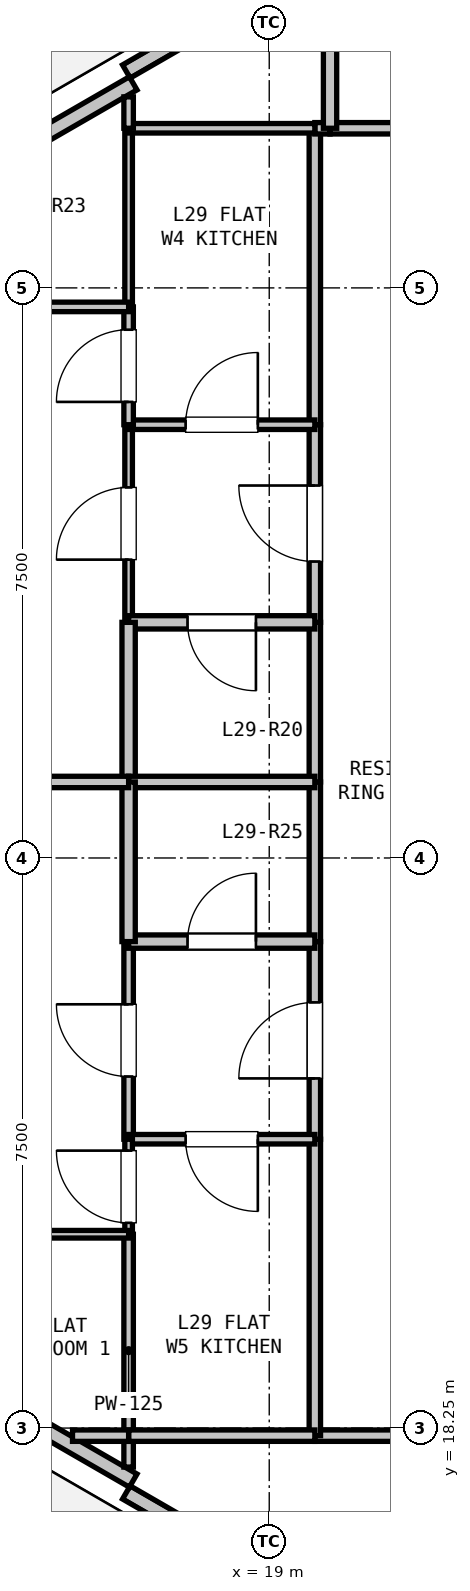
"""IFC4 building model, lengths in metres.
Left out: names, types, materials, properties, quantities, classifications, styles, units other than length and angle.
Written with IfcOpenShell. Run it as: python <this file> out.ifc"""

import sys

from ifc_helpers import new_model, si_unit, direction, frame, frame_2d, origin, place, context, subcontext, project, spatial, rectangle, extrude, element, fill, save


model = new_model("IFC4")
c1 = context("Model", 3, precision=1e-05, world=origin(), true_north=direction((0.0, 1.0)))
c2 = subcontext(c1, "Body", "Model", "MODEL_VIEW")
j1 = project(units=[si_unit("LENGTHUNIT", "METRE"), si_unit("PLANEANGLEUNIT", "RADIAN")], contexts=[c1])
p1 = place(None, origin())
s1 = spatial("IfcSite", under=j1, at=p1, CompositionType="ELEMENT")
p2 = place(p1, origin())
s2 = spatial("IfcBuilding", under=s1, at=p2, CompositionType="ELEMENT")
p3 = place(p2, frame((0.0, 0.0, 106.5)))
s3 = spatial("IfcBuildingStorey", under=s2, at=p3, CompositionType="ELEMENT", Elevation=106.5)
p4 = place(p3, frame((17.12, 36.097, 0.0), z_axis=(0.0, 0.0, 1.0), x_axis=(0.866027010039, 0.499997217876, 0.0)))
e1 = element("IfcWall", 1, at=p4, inside=s3, PredefinedType="PARAPET", context=c2, shape_type="SweptSolid", body=[
    extrude(rectangle(XDim=11.229, YDim=0.2, at=frame_2d((5.615, 0.0))), origin(), (0.0, 0.0, 1.0), 0.2),
])
p5 = place(p3, frame((15.738, 35.091, 0.0), z_axis=(0.0, 0.0, 1.0), x_axis=(0.866025371046, 0.500000056704, 0.0)))
e2 = element("IfcWall", 2, at=p5, inside=s3, PredefinedType="PARAPET", context=c2, shape_type="SweptSolid", body=[
    extrude(rectangle(XDim=1.7, YDim=0.2, at=frame_2d((0.85, 0.0))), origin(), (0.0, 0.0, 1.0), 2.67),
])
p6 = place(p3, frame((26.845, 11.788, 0.0), z_axis=(0.0, 0.0, 1.0), x_axis=(-0.866027010039, 0.499997217876, 0.0)))
e3 = element("IfcWall", 3, at=p6, inside=s3, PredefinedType="PARAPET", context=c2, shape_type="SweptSolid", body=[
    extrude(rectangle(XDim=11.229, YDim=0.2, at=frame_2d((5.615, 0.0))), origin(), (0.0, 0.0, 1.0), 0.2),
])
p7 = place(p3, frame((17.21, 17.559, 0.0), z_axis=(0.0, 0.0, 1.0), x_axis=(-0.866025371046, 0.500000056704, 0.0)))
e4 = element("IfcWall", 4, at=p7, inside=s3, PredefinedType="PARAPET", context=c2, shape_type="SweptSolid", body=[
    extrude(rectangle(XDim=1.7, YDim=0.2, at=frame_2d((0.85, 0.0))), origin(), (0.0, 0.0, 1.0), 2.67),
])
p8 = place(p3, frame((26.2, 18.15, 0.0), z_axis=(0.0, 0.0, 1.0), x_axis=(-1.0, 0.0, 0.0)))
e5 = element("IfcWall", 5, at=p8, inside=s3, PredefinedType="PARTITIONING", context=c2, shape_type="SweptSolid", body=[
    extrude(rectangle(XDim=6.6, YDim=0.15, at=frame_2d((3.3, 0.0))), origin(), (0.0, 0.0, 1.0), 2.423),
])
p9 = place(p8, frame((2.4, 0.0, 0.0)))
e6 = element("IfcOpeningElement", 6, at=p9, cuts=e5, PredefinedType="OPENING", context=c2, shape_type="SweptSolid", body=[
    extrude(rectangle(XDim=1.8, YDim=2.2, at=frame_2d((0.9, 1.1))), frame((0.0, 0.085, 0.0), z_axis=(0.0, -1.0, 0.0), x_axis=(1.0, 0.0, 0.0)), (0.0, 0.0, 1.0), 0.17),
])
p10 = place(p3, frame((19.6, 18.15, 0.0), z_axis=(0.0, 0.0, 1.0), x_axis=(0.0, 1.0, 0.0)))
e7 = element("IfcWall", 7, at=p10, inside=s3, PredefinedType="PARTITIONING", context=c2, shape_type="SweptSolid", body=[
    extrude(rectangle(XDim=3.9, YDim=0.15, at=frame_2d((1.95, 0.0))), origin(), (0.0, 0.0, 1.0), 2.423),
])
p11 = place(p3, frame((19.6, 22.05, 0.0), z_axis=(0.0, 0.0, 1.0), x_axis=(0.0, 1.0, 0.0)))
e8 = element("IfcWall", 8, at=p11, inside=s3, PredefinedType="PARTITIONING", context=c2, shape_type="SweptSolid", body=[
    extrude(rectangle(XDim=2.6, YDim=0.15, at=frame_2d((1.3, 0.0))), origin(), (0.0, 0.0, 1.0), 3.05),
])
p12 = place(p11, frame((0.8, 0.0, 0.0)))
e9 = element("IfcOpeningElement", 9, at=p12, cuts=e8, PredefinedType="OPENING", context=c2, shape_type="SweptSolid", body=[
    extrude(rectangle(XDim=1.0, YDim=2.15, at=frame_2d((0.5, 1.075))), frame((0.0, 0.085, 0.0), z_axis=(0.0, -1.0, 0.0), x_axis=(1.0, 0.0, 0.0)), (0.0, 0.0, 1.0), 0.17),
])
for number, where, z_axis, x_axis in (
    (10, (19.6, 24.65, 0.0), (0.0, 0.0, 1.0), (0.0, 1.0, 0.0)),
    (11, (19.6, 26.75, 0.0), (0.0, 0.0, 1.0), (0.0, 1.0, 0.0)),
):
    element("IfcWall", number, at=place(p3, frame(where, z_axis=z_axis, x_axis=x_axis)), inside=s3, PredefinedType="PARTITIONING", context=c2, shape_type="SweptSolid", body=[
        extrude(rectangle(XDim=2.1, YDim=0.15, at=frame_2d((1.05, 0.0))), origin(), (0.0, 0.0, 1.0), 3.05),
    ])
p13 = place(p3, frame((19.6, 28.85, 0.0), z_axis=(0.0, 0.0, 1.0), x_axis=(0.0, 1.0, 0.0)))
e12 = element("IfcWall", 12, at=p13, inside=s3, PredefinedType="PARTITIONING", context=c2, shape_type="SweptSolid", body=[
    extrude(rectangle(XDim=2.6, YDim=0.15, at=frame_2d((1.3, 0.0))), origin(), (0.0, 0.0, 1.0), 3.05),
])
p14 = place(p13, frame((0.8, 0.0, 0.0)))
e13 = element("IfcOpeningElement", 13, at=p14, cuts=e12, PredefinedType="OPENING", context=c2, shape_type="SweptSolid", body=[
    extrude(rectangle(XDim=1.0, YDim=2.15, at=frame_2d((0.5, 1.075))), frame((0.0, 0.085, 0.0), z_axis=(0.0, -1.0, 0.0), x_axis=(1.0, 0.0, 0.0)), (0.0, 0.0, 1.0), 0.17),
])
p15 = place(p3, frame((19.6, 31.45, 0.0), z_axis=(0.0, 0.0, 1.0), x_axis=(0.0, 1.0, 0.0)))
e14 = element("IfcWall", 14, at=p15, inside=s3, PredefinedType="PARTITIONING", context=c2, shape_type="SweptSolid", body=[
    extrude(rectangle(XDim=3.9, YDim=0.15, at=frame_2d((1.95, 0.0))), origin(), (0.0, 0.0, 1.0), 2.423),
])
p16 = place(p3, frame((19.6, 35.35, 0.0), z_axis=(0.0, 0.0, 1.0), x_axis=(1.0, 0.0, 0.0)))
e15 = element("IfcWall", 15, at=p16, inside=s3, PredefinedType="PARTITIONING", context=c2, shape_type="SweptSolid", body=[
    extrude(rectangle(XDim=0.2, YDim=0.15, at=frame_2d((0.1, 0.0))), origin(), (0.0, 0.0, 1.0), 3.05),
])
p17 = place(p3, frame((19.8, 35.35, 0.0), z_axis=(0.0, 0.0, 1.0), x_axis=(1.0, 0.0, 0.0)))
e16 = element("IfcWall", 16, at=p17, inside=s3, PredefinedType="PARTITIONING", context=c2, shape_type="SweptSolid", body=[
    extrude(rectangle(XDim=2.0, YDim=0.15, at=frame_2d((1.0, 0.0))), origin(), (0.0, 0.0, 1.0), 3.05),
])
p18 = place(p3, frame((17.15, 28.85, 0.0), z_axis=(0.0, 0.0, 1.0), x_axis=(0.0, 1.0, 0.0)))
e17 = element("IfcWall", 17, at=p18, inside=s3, PredefinedType="PARTITIONING", context=c2, shape_type="SweptSolid", body=[
    extrude(rectangle(XDim=2.6, YDim=0.1, at=frame_2d((1.3, 0.0))), origin(), (0.0, 0.0, 1.0), 3.05),
])
p19 = place(p18, frame((0.825, 0.0, 0.0)))
e18 = element("IfcOpeningElement", 18, at=p19, cuts=e17, PredefinedType="OPENING", context=c2, shape_type="SweptSolid", body=[
    extrude(rectangle(XDim=0.95, YDim=2.1, at=frame_2d((0.475, 1.05))), frame((0.0, 0.06, 0.0), z_axis=(0.0, -1.0, 0.0), x_axis=(1.0, 0.0, 0.0)), (0.0, 0.0, 1.0), 0.12),
])
p20 = place(p3, frame((17.15, 31.45, 0.0), z_axis=(0.0, 0.0, 1.0), x_axis=(1.0, 0.0, 0.0)))
e19 = element("IfcWall", 19, at=p20, inside=s3, PredefinedType="PARTITIONING", context=c2, shape_type="SweptSolid", body=[
    extrude(rectangle(XDim=2.45, YDim=0.125, at=frame_2d((1.225, 0.0))), origin(), (0.0, 0.0, 1.0), 3.05),
])
p21 = place(p20, frame((0.75, 0.0, 0.0)))
e20 = element("IfcOpeningElement", 20, at=p21, cuts=e19, PredefinedType="OPENING", context=c2, shape_type="SweptSolid", body=[
    extrude(rectangle(XDim=0.95, YDim=2.1, at=frame_2d((0.475, 1.05))), frame((0.0, 0.073, 0.0), z_axis=(0.0, -1.0, 0.0), x_axis=(1.0, 0.0, 0.0)), (0.0, 0.0, 1.0), 0.145),
])
p22 = place(p3, frame((19.6, 28.85, 0.0), z_axis=(0.0, 0.0, 1.0), x_axis=(-1.0, 0.0, 0.0)))
e21 = element("IfcWall", 21, at=p22, inside=s3, PredefinedType="PLUMBINGWALL", context=c2, shape_type="SweptSolid", body=[
    extrude(rectangle(XDim=2.45, YDim=0.175, at=frame_2d((1.225, 0.0))), origin(), (0.0, 0.0, 1.0), 3.05),
])
p23 = place(p22, frame((0.775, 0.0, 0.0)))
e22 = element("IfcOpeningElement", 22, at=p23, cuts=e21, PredefinedType="OPENING", context=c2, shape_type="SweptSolid", body=[
    extrude(rectangle(XDim=0.9, YDim=2.1, at=frame_2d((0.45, 1.05))), frame((0.0, 0.097, 0.0), z_axis=(0.0, -1.0, 0.0), x_axis=(1.0, 0.0, 0.0)), (0.0, 0.0, 1.0), 0.195),
])
p24 = place(p3, frame((17.15, 22.05, 0.0), z_axis=(0.0, 0.0, 1.0), x_axis=(0.0, 1.0, 0.0)))
e23 = element("IfcWall", 23, at=p24, inside=s3, PredefinedType="PARTITIONING", context=c2, shape_type="SweptSolid", body=[
    extrude(rectangle(XDim=2.6, YDim=0.125, at=frame_2d((1.3, 0.0))), origin(), (0.0, 0.0, 1.0), 3.05),
])
p25 = place(p24, frame((0.825, 0.0, 0.0)))
e24 = element("IfcOpeningElement", 24, at=p25, cuts=e23, PredefinedType="OPENING", context=c2, shape_type="SweptSolid", body=[
    extrude(rectangle(XDim=0.95, YDim=2.1, at=frame_2d((0.475, 1.05))), frame((0.0, 0.073, 0.0), z_axis=(0.0, -1.0, 0.0), x_axis=(1.0, 0.0, 0.0)), (0.0, 0.0, 1.0), 0.145),
])
p26 = place(p3, frame((17.15, 24.65, 0.0), z_axis=(0.0, 0.0, 1.0), x_axis=(1.0, 0.0, 0.0)))
e25 = element("IfcWall", 25, at=p26, inside=s3, PredefinedType="PLUMBINGWALL", context=c2, shape_type="SweptSolid", body=[
    extrude(rectangle(XDim=2.45, YDim=0.175, at=frame_2d((1.225, 0.0))), origin(), (0.0, 0.0, 1.0), 3.05),
])
p27 = place(p26, frame((0.775, 0.0, 0.0)))
e26 = element("IfcOpeningElement", 26, at=p27, cuts=e25, PredefinedType="OPENING", context=c2, shape_type="SweptSolid", body=[
    extrude(rectangle(XDim=0.9, YDim=2.1, at=frame_2d((0.45, 1.05))), frame((0.0, 0.097, 0.0), z_axis=(0.0, -1.0, 0.0), x_axis=(1.0, 0.0, 0.0)), (0.0, 0.0, 1.0), 0.195),
])
p28 = place(p3, frame((19.6, 22.05, 0.0), z_axis=(0.0, 0.0, 1.0), x_axis=(-1.0, 0.0, 0.0)))
e27 = element("IfcWall", 27, at=p28, inside=s3, PredefinedType="PARTITIONING", context=c2, shape_type="SweptSolid", body=[
    extrude(rectangle(XDim=2.45, YDim=0.125, at=frame_2d((1.225, 0.0))), origin(), (0.0, 0.0, 1.0), 3.05),
])
p29 = place(p28, frame((0.75, 0.0, 0.0)))
e28 = element("IfcOpeningElement", 28, at=p29, cuts=e27, PredefinedType="OPENING", context=c2, shape_type="SweptSolid", body=[
    extrude(rectangle(XDim=0.95, YDim=2.1, at=frame_2d((0.475, 1.05))), frame((0.0, 0.073, 0.0), z_axis=(0.0, -1.0, 0.0), x_axis=(1.0, 0.0, 0.0)), (0.0, 0.0, 1.0), 0.145),
])
p30 = place(p3, frame((19.8, 35.35, 0.0), z_axis=(0.0, 0.0, 1.0), x_axis=(0.0, 1.0, 0.0)))
e29 = element("IfcWall", 29, at=p30, inside=s3, PredefinedType="PLUMBINGWALL", context=c2, shape_type="SweptSolid", body=[
    extrude(rectangle(XDim=2.252, YDim=0.175, at=frame_2d((1.126, 0.0))), origin(), (0.0, 0.0, 1.0), 2.365),
])
p31 = place(p3, frame((17.15, 26.75, 0.0), z_axis=(0.0, 0.0, 1.0), x_axis=(0.0, 1.0, 0.0)))
e30 = element("IfcWall", 30, at=p31, inside=s3, PredefinedType="PLUMBINGWALL", context=c2, shape_type="SweptSolid", body=[
    extrude(rectangle(XDim=2.1, YDim=0.175, at=frame_2d((1.05, 0.0))), origin(), (0.0, 0.0, 1.0), 3.05),
])
p32 = place(p3, frame((19.6, 26.75, 0.0), z_axis=(0.0, 0.0, 1.0), x_axis=(-1.0, 0.0, 0.0)))
e31 = element("IfcWall", 31, at=p32, inside=s3, PredefinedType="PARTITIONING", context=c2, shape_type="SweptSolid", body=[
    extrude(rectangle(XDim=2.45, YDim=0.15, at=frame_2d((1.225, 0.0))), origin(), (0.0, 0.0, 1.0), 3.05),
])
p33 = place(p3, frame((17.15, 31.45, 0.0), z_axis=(0.0, 0.0, 1.0), x_axis=(0.0, 1.0, 0.0)))
e32 = element("IfcWall", 32, at=p33, inside=s3, PredefinedType="PARTITIONING", context=c2, shape_type="SweptSolid", body=[
    extrude(rectangle(XDim=1.55, YDim=0.125, at=frame_2d((0.775, 0.0))), origin(), (0.0, 0.0, 1.0), 2.423),
])
p34 = place(p33, frame((0.3, 0.0, 0.0)))
e33 = element("IfcOpeningElement", 33, at=p34, cuts=e32, PredefinedType="OPENING", context=c2, shape_type="SweptSolid", body=[
    extrude(rectangle(XDim=0.95, YDim=2.1, at=frame_2d((0.475, 1.05))), frame((0.0, 0.073, 0.0), z_axis=(0.0, -1.0, 0.0), x_axis=(1.0, 0.0, 0.0)), (0.0, 0.0, 1.0), 0.145),
])
p35 = place(p3, frame((17.15, 33.0, 0.0), z_axis=(0.0, 0.0, 1.0), x_axis=(0.0, 1.0, 0.0)))
e34 = element("IfcWall", 34, at=p35, inside=s3, PredefinedType="PARTITIONING", context=c2, shape_type="SweptSolid", body=[
    extrude(rectangle(XDim=2.35, YDim=0.1, at=frame_2d((1.175, 0.0))), origin(), (0.0, 0.0, 1.0), 2.365),
])
p36 = place(p3, frame((17.15, 35.35, 0.0), z_axis=(0.0, 0.0, 1.0), x_axis=(1.0, 0.0, 0.0)))
e35 = element("IfcWall", 35, at=p36, inside=s3, PredefinedType="PARTITIONING", context=c2, shape_type="SweptSolid", body=[
    extrude(rectangle(XDim=2.45, YDim=0.125, at=frame_2d((1.225, 0.0))), origin(), (0.0, 0.0, 1.0), 2.365),
])
p37 = place(p3, frame((17.15, 24.65, 0.0), z_axis=(0.0, 0.0, 1.0), x_axis=(0.0, 1.0, 0.0)))
e36 = element("IfcWall", 36, at=p37, inside=s3, PredefinedType="PLUMBINGWALL", context=c2, shape_type="SweptSolid", body=[
    extrude(rectangle(XDim=2.1, YDim=0.175, at=frame_2d((1.05, 0.0))), origin(), (0.0, 0.0, 1.0), 3.05),
])
p38 = place(p3, frame((17.15, 17.737, 0.0), z_axis=(0.0, 0.0, 1.0), x_axis=(0.0, 1.0, 0.0)))
e37 = element("IfcWall", 37, at=p38, inside=s3, PredefinedType="PARTITIONING", context=c2, shape_type="SweptSolid", body=[
    extrude(rectangle(XDim=3.063, YDim=0.125, at=frame_2d((1.532, 0.0))), origin(), (0.0, 0.0, 1.0), 2.365),
])
p39 = place(p3, frame((17.15, 20.8, 0.0), z_axis=(0.0, 0.0, 1.0), x_axis=(0.0, 1.0, 0.0)))
e38 = element("IfcWall", 38, at=p39, inside=s3, PredefinedType="PARTITIONING", context=c2, shape_type="SweptSolid", body=[
    extrude(rectangle(XDim=1.25, YDim=0.1, at=frame_2d((0.625, 0.0))), origin(), (0.0, 0.0, 1.0), 2.423),
])
p40 = place(p39, frame((0.15, 0.0, 0.0)))
e39 = element("IfcOpeningElement", 39, at=p40, cuts=e38, PredefinedType="OPENING", context=c2, shape_type="SweptSolid", body=[
    extrude(rectangle(XDim=0.95, YDim=2.1, at=frame_2d((0.475, 1.05))), frame((0.0, 0.06, 0.0), z_axis=(0.0, -1.0, 0.0), x_axis=(1.0, 0.0, 0.0)), (0.0, 0.0, 1.0), 0.12),
])
p41 = place(p3, frame((19.6, 18.15, 0.0), z_axis=(0.0, 0.0, 1.0), x_axis=(-1.0, 0.0, 0.0)))
e40 = element("IfcWall", 40, at=p41, inside=s3, PredefinedType="PARTITIONING", context=c2, shape_type="SweptSolid", body=[
    extrude(rectangle(XDim=2.45, YDim=0.15, at=frame_2d((1.225, 0.0))), origin(), (0.0, 0.0, 1.0), 2.365),
])
p42 = place(p3, frame((16.412, 18.15, 0.0), z_axis=(0.0, 0.0, 1.0), x_axis=(1.0, 0.0, 0.0)))
e41 = element("IfcWall", 41, at=p42, inside=s3, PredefinedType="PARTITIONING", context=c2, shape_type="SweptSolid", body=[
    extrude(rectangle(XDim=0.738, YDim=0.15, at=frame_2d((0.369, 0.0))), origin(), (0.0, 0.0, 1.0), 2.365),
])
p43 = place(p3, frame((12.027, 33.0, 0.0), z_axis=(0.0, 0.0, 1.0), x_axis=(1.0, 0.0, 0.0)))
e42 = element("IfcWall", 42, at=p43, inside=s3, PredefinedType="PARTITIONING", context=c2, shape_type="SweptSolid", body=[
    extrude(rectangle(XDim=5.123, YDim=0.125, at=frame_2d((2.562, 0.0))), origin(), (0.0, 0.0, 1.0), 2.365),
])
p44 = place(p43, frame((2.086, 0.0, 0.0)))
e43 = element("IfcOpeningElement", 43, at=p44, cuts=e42, PredefinedType="OPENING", context=c2, shape_type="SweptSolid", body=[
    extrude(rectangle(XDim=0.95, YDim=2.1, at=frame_2d((0.475, 1.05))), frame((0.0, 0.073, 0.0), z_axis=(0.0, -1.0, 0.0), x_axis=(1.0, 0.0, 0.0)), (0.0, 0.0, 1.0), 0.145),
])
p45 = place(p3, frame((17.15, 26.75, 0.0), z_axis=(0.0, 0.0, 1.0), x_axis=(-1.0, 0.0, 0.0)))
e44 = element("IfcWall", 44, at=p45, inside=s3, PredefinedType="PARTITIONING", context=c2, shape_type="SweptSolid", body=[
    extrude(rectangle(XDim=11.814, YDim=0.15, at=frame_2d((5.907, 0.0))), origin(), (0.0, 0.0, 1.0), 2.715),
])
p46 = place(p3, frame((17.15, 35.763, 0.0), z_axis=(0.0, 0.0, 1.0), x_axis=(0.0, -1.0, 0.0)))
e45 = element("IfcWall", 45, at=p46, inside=s3, PredefinedType="PARTITIONING", context=c2, shape_type="SweptSolid", body=[
    extrude(rectangle(XDim=0.413, YDim=0.125, at=frame_2d((0.207, 0.0))), origin(), (0.0, 0.0, 1.0), 2.365),
])
p47 = place(p3, frame((17.15, 20.8, 0.0), z_axis=(0.0, 0.0, 1.0), x_axis=(-1.0, 0.0, 0.0)))
e46 = element("IfcWall", 46, at=p47, inside=s3, PredefinedType="PARTITIONING", context=c2, shape_type="SweptSolid", body=[
    extrude(rectangle(XDim=5.643, YDim=0.1, at=frame_2d((2.821, 0.0))), origin(), (0.0, 0.0, 1.0), 2.365),
])
p48 = place(p47, frame((2.346, 0.0, 0.0)))
e47 = element("IfcOpeningElement", 47, at=p48, cuts=e46, PredefinedType="OPENING", context=c2, shape_type="SweptSolid", body=[
    extrude(rectangle(XDim=0.95, YDim=2.1, at=frame_2d((0.475, 1.05))), frame((0.0, 0.06, 0.0), z_axis=(0.0, -1.0, 0.0), x_axis=(1.0, 0.0, 0.0)), (0.0, 0.0, 1.0), 0.12),
])
p49 = place(p14, origin())
e48 = element("IfcDoor", 48, at=p49, inside=s3, OperationType="SINGLE_SWING_RIGHT", PredefinedType="DOOR", context=c2, shape_type="SweptSolid", body=[
    extrude(rectangle(XDim=1.0, YDim=2.15, at=frame_2d((0.5, 1.075))), frame((0.0, 0.025, 0.0), z_axis=(0.0, -1.0, 0.0), x_axis=(1.0, 0.0, 0.0)), (0.0, 0.0, 1.0), 0.05),
])
fill(e13, e48)
p50 = place(p12, origin())
e49 = element("IfcDoor", 49, at=p50, inside=s3, OperationType="SINGLE_SWING_LEFT", PredefinedType="DOOR", context=c2, shape_type="SweptSolid", body=[
    extrude(rectangle(XDim=1.0, YDim=2.15, at=frame_2d((0.5, 1.075))), frame((0.0, 0.025, 0.0), z_axis=(0.0, -1.0, 0.0), x_axis=(1.0, 0.0, 0.0)), (0.0, 0.0, 1.0), 0.05),
])
fill(e9, e49)
p51 = place(p23, origin())
e50 = element("IfcDoor", 50, at=p51, inside=s3, OperationType="SINGLE_SWING_LEFT", PredefinedType="DOOR", context=c2, shape_type="SweptSolid", body=[
    extrude(rectangle(XDim=0.9, YDim=2.1, at=frame_2d((0.45, 1.05))), frame((0.0, 0.025, 0.0), z_axis=(0.0, -1.0, 0.0), x_axis=(1.0, 0.0, 0.0)), (0.0, 0.0, 1.0), 0.05),
])
fill(e22, e50)
p52 = place(p21, origin())
e51 = element("IfcDoor", 51, at=p52, inside=s3, OperationType="SINGLE_SWING_RIGHT", PredefinedType="DOOR", context=c2, shape_type="SweptSolid", body=[
    extrude(rectangle(XDim=0.95, YDim=2.1, at=frame_2d((0.475, 1.05))), frame((0.0, 0.025, 0.0), z_axis=(0.0, -1.0, 0.0), x_axis=(1.0, 0.0, 0.0)), (0.0, 0.0, 1.0), 0.05),
])
fill(e20, e51)
p53 = place(p19, origin())
e52 = element("IfcDoor", 52, at=p53, inside=s3, OperationType="SINGLE_SWING_LEFT", PredefinedType="DOOR", context=c2, shape_type="SweptSolid", body=[
    extrude(rectangle(XDim=0.95, YDim=2.1, at=frame_2d((0.475, 1.05))), frame((0.0, 0.025, 0.0), z_axis=(0.0, -1.0, 0.0), x_axis=(1.0, 0.0, 0.0)), (0.0, 0.0, 1.0), 0.05),
])
fill(e18, e52)
p54 = place(p27, origin())
e53 = element("IfcDoor", 53, at=p54, inside=s3, OperationType="SINGLE_SWING_RIGHT", PredefinedType="DOOR", context=c2, shape_type="SweptSolid", body=[
    extrude(rectangle(XDim=0.9, YDim=2.1, at=frame_2d((0.45, 1.05))), frame((0.0, 0.025, 0.0), z_axis=(0.0, -1.0, 0.0), x_axis=(1.0, 0.0, 0.0)), (0.0, 0.0, 1.0), 0.05),
])
fill(e26, e53)
p55 = place(p29, origin())
e54 = element("IfcDoor", 54, at=p55, inside=s3, OperationType="SINGLE_SWING_LEFT", PredefinedType="DOOR", context=c2, shape_type="SweptSolid", body=[
    extrude(rectangle(XDim=0.95, YDim=2.1, at=frame_2d((0.475, 1.05))), frame((0.0, 0.025, 0.0), z_axis=(0.0, -1.0, 0.0), x_axis=(1.0, 0.0, 0.0)), (0.0, 0.0, 1.0), 0.05),
])
fill(e28, e54)
p56 = place(p25, origin())
e55 = element("IfcDoor", 55, at=p56, inside=s3, OperationType="SINGLE_SWING_RIGHT", PredefinedType="DOOR", context=c2, shape_type="SweptSolid", body=[
    extrude(rectangle(XDim=0.95, YDim=2.1, at=frame_2d((0.475, 1.05))), frame((0.0, 0.025, 0.0), z_axis=(0.0, -1.0, 0.0), x_axis=(1.0, 0.0, 0.0)), (0.0, 0.0, 1.0), 0.05),
])
fill(e24, e55)
p57 = place(p34, origin())
e56 = element("IfcDoor", 56, at=p57, inside=s3, OperationType="SINGLE_SWING_LEFT", PredefinedType="DOOR", context=c2, shape_type="SweptSolid", body=[
    extrude(rectangle(XDim=0.95, YDim=2.1, at=frame_2d((0.475, 1.05))), frame((0.0, 0.025, 0.0), z_axis=(0.0, -1.0, 0.0), x_axis=(1.0, 0.0, 0.0)), (0.0, 0.0, 1.0), 0.05),
])
fill(e33, e56)
p58 = place(p40, origin())
e57 = element("IfcDoor", 57, at=p58, inside=s3, OperationType="SINGLE_SWING_RIGHT", PredefinedType="DOOR", context=c2, shape_type="SweptSolid", body=[
    extrude(rectangle(XDim=0.95, YDim=2.1, at=frame_2d((0.475, 1.05))), frame((0.0, 0.025, 0.0), z_axis=(0.0, -1.0, 0.0), x_axis=(1.0, 0.0, 0.0)), (0.0, 0.0, 1.0), 0.05),
])
fill(e39, e57)
save(model, sys.argv[1])
